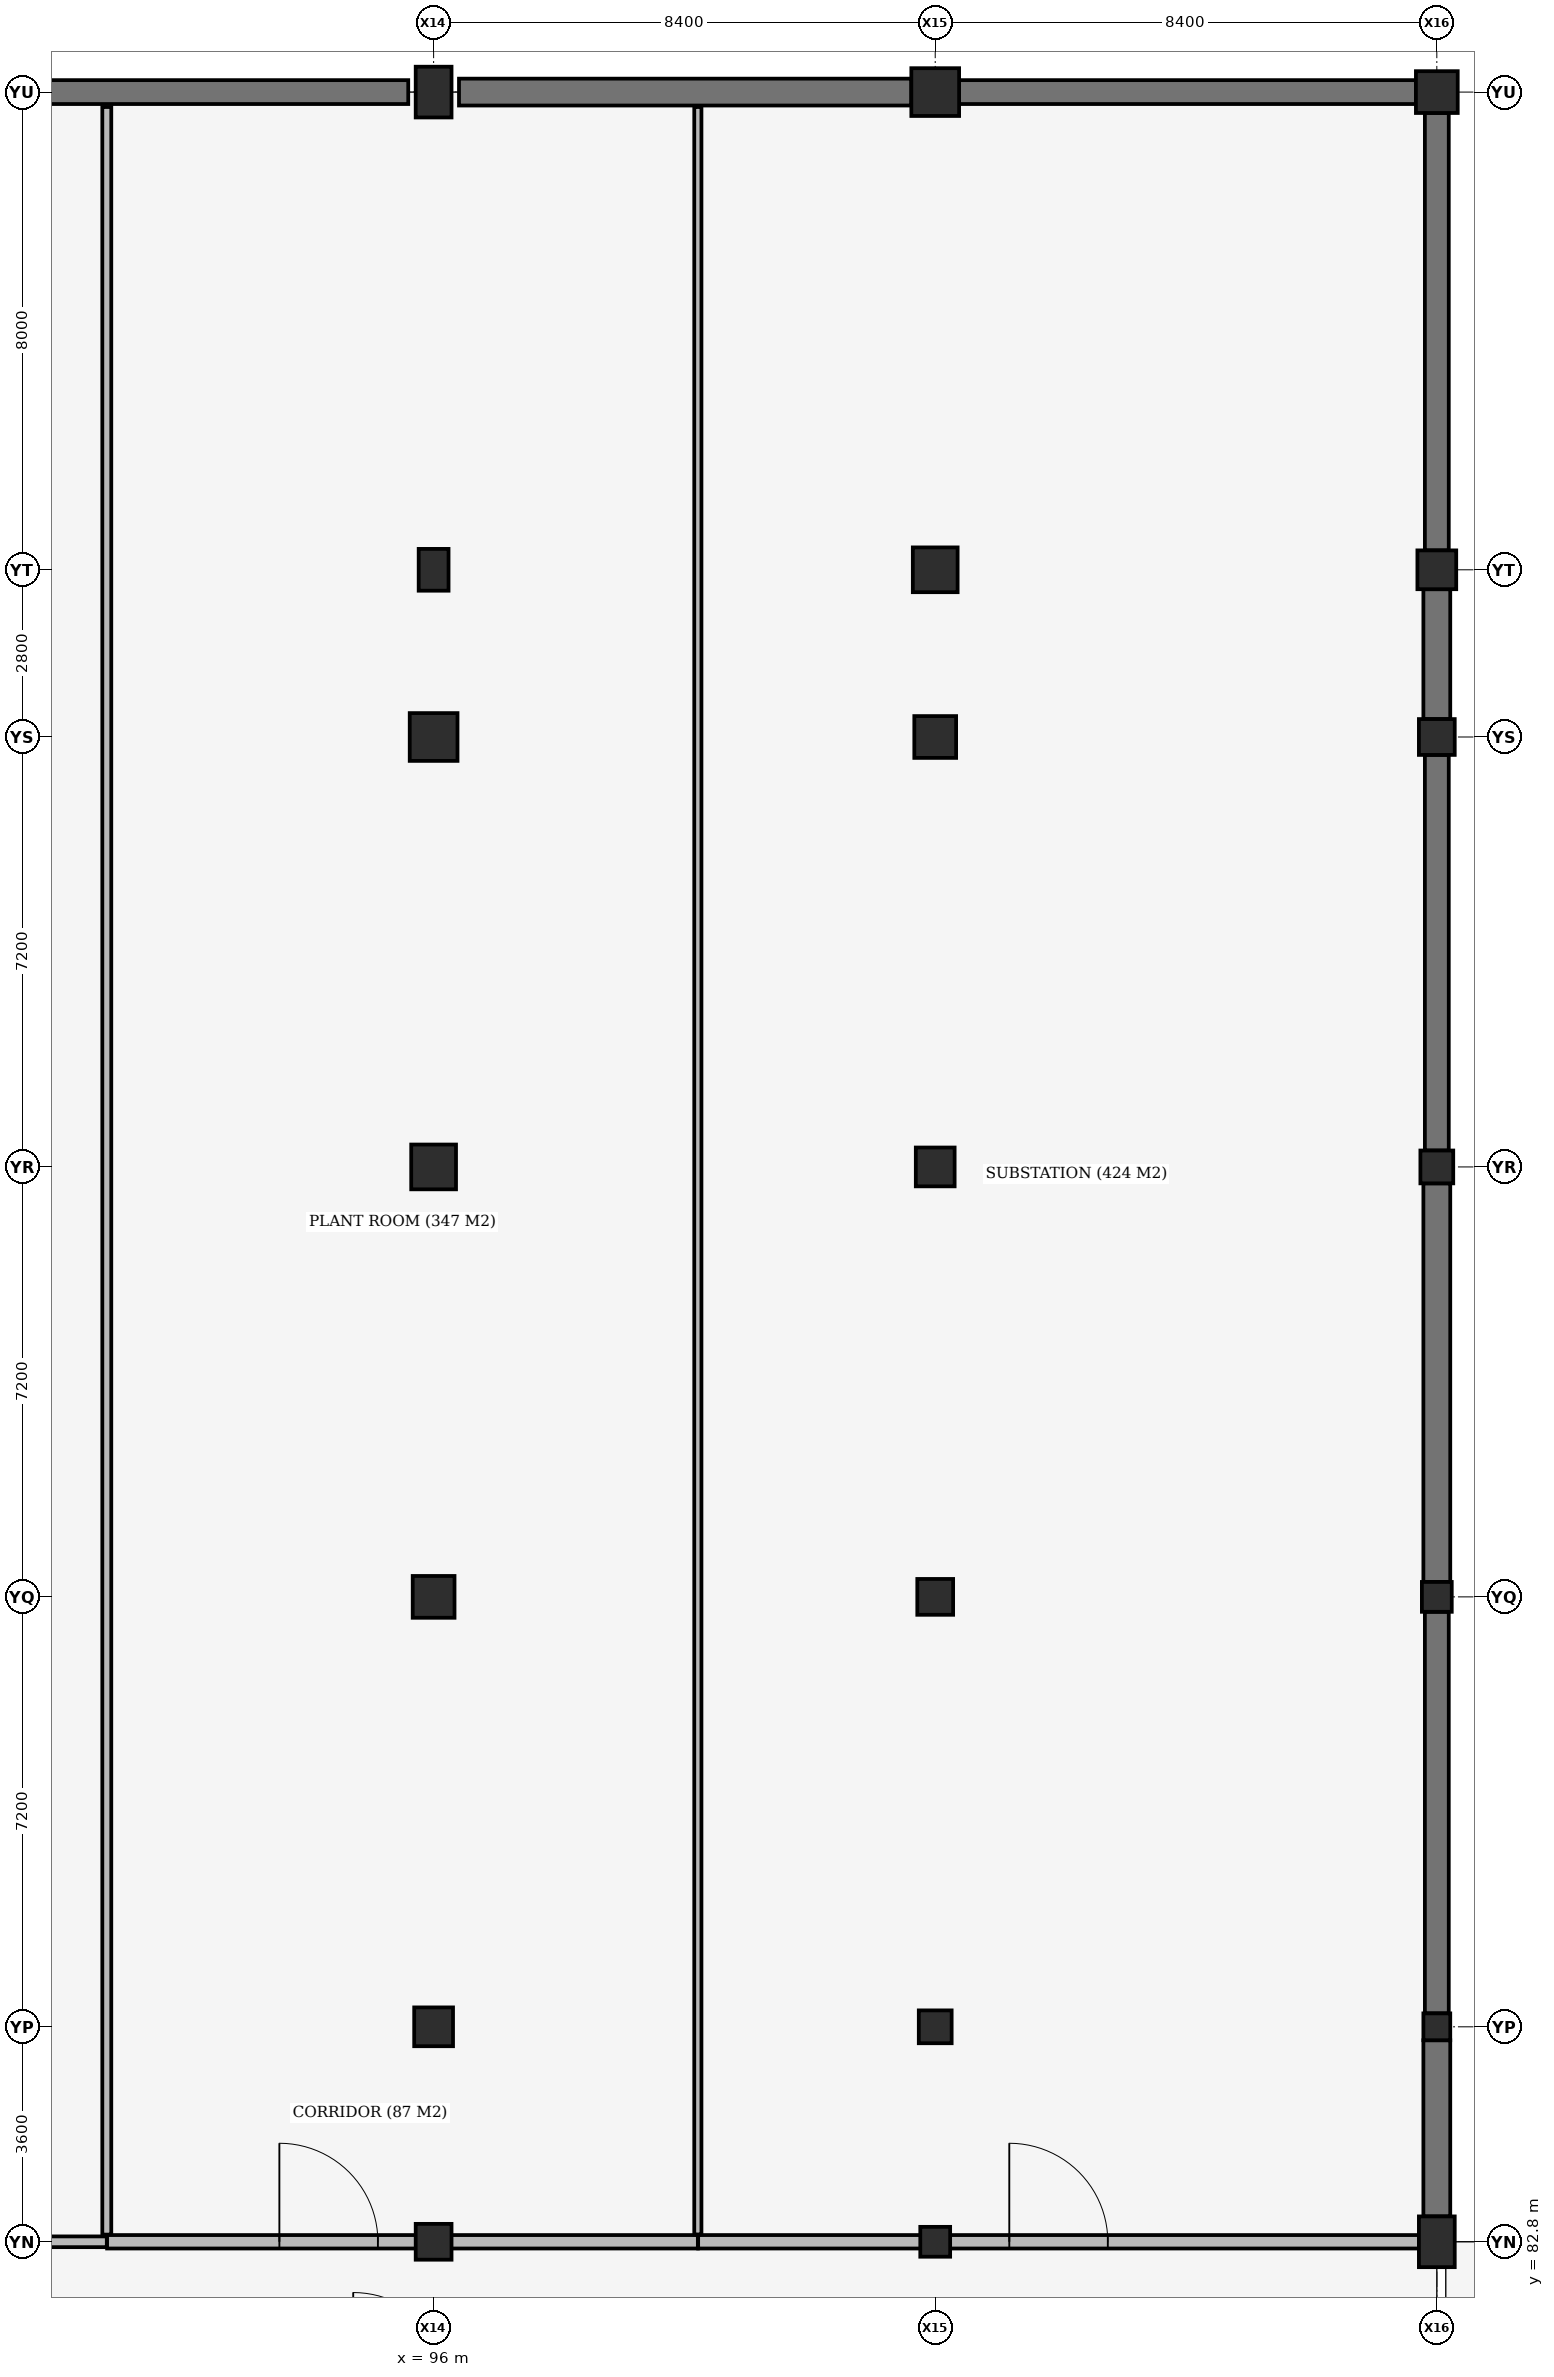
"""IFC4 building model, lengths in metres.
Left out: names, types, materials, properties, quantities, classifications, styles, units other than length and angle.
Written with IfcOpenShell. Run it as: python <this file> out.ifc"""

import sys

from ifc_helpers import new_model, si_unit, direction, frame, frame_2d, origin, origin_2d, place, context, subcontext, project, spatial, rectangle, extrude, element, fill, save


model = new_model("IFC4")
c1 = context("Model", 3, precision=1e-05, world=origin(), true_north=direction((0.0, 1.0)))
c2 = subcontext(c1, "Body", "Model", "MODEL_VIEW")
j1 = project(units=[si_unit("LENGTHUNIT", "METRE"), si_unit("PLANEANGLEUNIT", "RADIAN")], contexts=[c1])
p1 = place(None, origin())
s1 = spatial("IfcSite", under=j1, at=p1, CompositionType="ELEMENT")
p2 = place(p1, origin())
s2 = spatial("IfcBuilding", under=s1, at=p2, CompositionType="ELEMENT")
p3 = place(p2, frame((0.0, 0.0, -4.5)))
s3 = spatial("IfcBuildingStorey", under=s2, at=p3, CompositionType="ELEMENT", Elevation=-4.5)
p4 = place(p3, frame((96.0, 82.8, -0.46), z_axis=(0.0, 0.0, 1.0), x_axis=(1.0, 0.0, 0.0)))
e1 = element("IfcColumn", 1, at=p4, inside=s3, PredefinedType="COLUMN", context=c2, shape_type="SweptSolid", body=[
    extrude(rectangle(XDim=0.6, YDim=0.6, at=origin_2d()), origin(), (0.0, 0.0, 1.0), 4.61),
])
p5 = place(p3, frame((96.0, 86.4, -0.46), z_axis=(0.0, 0.0, 1.0), x_axis=(1.0, 0.0, 0.0)))
e2 = element("IfcColumn", 2, at=p5, inside=s3, PredefinedType="COLUMN", context=c2, shape_type="SweptSolid", body=[
    extrude(rectangle(XDim=0.65, YDim=0.65, at=origin_2d()), origin(), (0.0, 0.0, 1.0), 4.61),
])
p6 = place(p3, frame((96.0, 93.6, -0.46), z_axis=(0.0, 0.0, 1.0), x_axis=(1.0, 0.0, 0.0)))
e3 = element("IfcColumn", 3, at=p6, inside=s3, PredefinedType="COLUMN", context=c2, shape_type="SweptSolid", body=[
    extrude(rectangle(XDim=0.7, YDim=0.7, at=origin_2d()), origin(), (0.0, 0.0, 1.0), 4.72),
])
p7 = place(p3, frame((96.0, 100.8, -0.46), z_axis=(0.0, 0.0, 1.0), x_axis=(1.0, 0.0, 0.0)))
e4 = element("IfcColumn", 4, at=p7, inside=s3, PredefinedType="COLUMN", context=c2, shape_type="SweptSolid", body=[
    extrude(rectangle(XDim=0.75, YDim=0.75, at=origin_2d()), origin(), (0.0, 0.0, 1.0), 4.72),
])
p8 = place(p3, frame((96.0, 108.0, -0.46), z_axis=(0.0, 0.0, 1.0), x_axis=(1.0, 0.0, 0.0)))
e5 = element("IfcColumn", 5, at=p8, inside=s3, PredefinedType="COLUMN", context=c2, shape_type="SweptSolid", body=[
    extrude(rectangle(XDim=0.8, YDim=0.8, at=origin_2d()), origin(), (0.0, 0.0, 1.0), 4.61),
])
p9 = place(p3, frame((96.0, 110.8, -0.46), z_axis=(0.0, 0.0, 1.0), x_axis=(1.0, 0.0, 0.0)))
e6 = element("IfcColumn", 6, at=p9, inside=s3, PredefinedType="COLUMN", context=c2, shape_type="SweptSolid", body=[
    extrude(rectangle(XDim=0.5, YDim=0.7, at=origin_2d()), origin(), (0.0, 0.0, 1.0), 4.61),
])
p10 = place(p3, frame((96.0, 118.8, -0.46), z_axis=(0.0, 0.0, 1.0), x_axis=(1.0, 0.0, 0.0)))
e7 = element("IfcColumn", 7, at=p10, inside=s3, PredefinedType="COLUMN", context=c2, shape_type="SweptSolid", body=[
    extrude(rectangle(XDim=0.6, YDim=0.85, at=origin_2d()), origin(), (0.0, 0.0, 1.0), 4.61),
])
p11 = place(p3, frame((104.4, 82.8, -0.46), z_axis=(0.0, 0.0, 1.0), x_axis=(1.0, 0.0, 0.0)))
e8 = element("IfcColumn", 8, at=p11, inside=s3, PredefinedType="COLUMN", context=c2, shape_type="SweptSolid", body=[
    extrude(rectangle(XDim=0.5, YDim=0.5, at=origin_2d()), origin(), (0.0, 0.0, 1.0), 4.61),
])
p12 = place(p3, frame((104.4, 86.4, -0.46), z_axis=(0.0, 0.0, 1.0), x_axis=(1.0, 0.0, 0.0)))
e9 = element("IfcColumn", 9, at=p12, inside=s3, PredefinedType="COLUMN", context=c2, shape_type="SweptSolid", body=[
    extrude(rectangle(XDim=0.55, YDim=0.55, at=origin_2d()), origin(), (0.0, 0.0, 1.0), 4.61),
])
p13 = place(p3, frame((104.4, 93.6, -0.46), z_axis=(0.0, 0.0, 1.0), x_axis=(1.0, 0.0, 0.0)))
e10 = element("IfcColumn", 10, at=p13, inside=s3, PredefinedType="COLUMN", context=c2, shape_type="SweptSolid", body=[
    extrude(rectangle(XDim=0.6, YDim=0.6, at=origin_2d()), origin(), (0.0, 0.0, 1.0), 4.72),
])
p14 = place(p3, frame((104.4, 100.8, -0.46), z_axis=(0.0, 0.0, 1.0), x_axis=(1.0, 0.0, 0.0)))
e11 = element("IfcColumn", 11, at=p14, inside=s3, PredefinedType="COLUMN", context=c2, shape_type="SweptSolid", body=[
    extrude(rectangle(XDim=0.65, YDim=0.65, at=origin_2d()), origin(), (0.0, 0.0, 1.0), 4.72),
])
p15 = place(p3, frame((104.4, 108.0, -0.46), z_axis=(0.0, 0.0, 1.0), x_axis=(1.0, 0.0, 0.0)))
e12 = element("IfcColumn", 12, at=p15, inside=s3, PredefinedType="COLUMN", context=c2, shape_type="SweptSolid", body=[
    extrude(rectangle(XDim=0.7, YDim=0.7, at=origin_2d()), origin(), (0.0, 0.0, 1.0), 4.61),
])
p16 = place(p3, frame((104.4, 110.8, -0.46), z_axis=(0.0, 0.0, 1.0), x_axis=(1.0, 0.0, 0.0)))
e13 = element("IfcColumn", 13, at=p16, inside=s3, PredefinedType="COLUMN", context=c2, shape_type="SweptSolid", body=[
    extrude(rectangle(XDim=0.75, YDim=0.75, at=origin_2d()), origin(), (0.0, 0.0, 1.0), 4.61),
])
p17 = place(p3, frame((104.4, 118.8, -0.46), z_axis=(0.0, 0.0, 1.0), x_axis=(1.0, 0.0, 0.0)))
e14 = element("IfcColumn", 14, at=p17, inside=s3, PredefinedType="COLUMN", context=c2, shape_type="SweptSolid", body=[
    extrude(rectangle(XDim=0.8, YDim=0.8, at=origin_2d()), origin(), (0.0, 0.0, 1.0), 4.61),
])
p18 = place(p3, frame((112.8, 82.8, -0.46), z_axis=(0.0, 0.0, 1.0), x_axis=(1.0, 0.0, 0.0)))
e15 = element("IfcColumn", 15, at=p18, inside=s3, PredefinedType="COLUMN", context=c2, shape_type="SweptSolid", body=[
    extrude(rectangle(XDim=0.6, YDim=0.85, at=origin_2d()), origin(), (0.0, 0.0, 1.0), 4.61),
])
p19 = place(p3, frame((112.8, 86.4, -0.46), z_axis=(0.0, 0.0, 1.0), x_axis=(1.0, 0.0, 0.0)))
e16 = element("IfcColumn", 16, at=p19, inside=s3, PredefinedType="COLUMN", context=c2, shape_type="SweptSolid", body=[
    extrude(rectangle(XDim=0.45, YDim=0.45, at=origin_2d()), origin(), (0.0, 0.0, 1.0), 4.61),
])
p20 = place(p3, frame((112.8, 93.6, -0.46), z_axis=(0.0, 0.0, 1.0), x_axis=(1.0, 0.0, 0.0)))
e17 = element("IfcColumn", 17, at=p20, inside=s3, PredefinedType="COLUMN", context=c2, shape_type="SweptSolid", body=[
    extrude(rectangle(XDim=0.5, YDim=0.5, at=origin_2d()), origin(), (0.0, 0.0, 1.0), 4.61),
])
p21 = place(p3, frame((112.8, 100.8, -0.46), z_axis=(0.0, 0.0, 1.0), x_axis=(1.0, 0.0, 0.0)))
e18 = element("IfcColumn", 18, at=p21, inside=s3, PredefinedType="COLUMN", context=c2, shape_type="SweptSolid", body=[
    extrude(rectangle(XDim=0.55, YDim=0.55, at=origin_2d()), origin(), (0.0, 0.0, 1.0), 4.61),
])
p22 = place(p3, frame((112.8, 108.0, -0.46), z_axis=(0.0, 0.0, 1.0), x_axis=(1.0, 0.0, 0.0)))
e19 = element("IfcColumn", 19, at=p22, inside=s3, PredefinedType="COLUMN", context=c2, shape_type="SweptSolid", body=[
    extrude(rectangle(XDim=0.6, YDim=0.6, at=origin_2d()), origin(), (0.0, 0.0, 1.0), 4.61),
])
p23 = place(p3, frame((112.8, 110.8, -0.46), z_axis=(0.0, 0.0, 1.0), x_axis=(1.0, 0.0, 0.0)))
e20 = element("IfcColumn", 20, at=p23, inside=s3, PredefinedType="COLUMN", context=c2, shape_type="SweptSolid", body=[
    extrude(rectangle(XDim=0.65, YDim=0.65, at=origin_2d()), origin(), (0.0, 0.0, 1.0), 4.61),
])
p24 = place(p3, frame((112.8, 118.8, -0.46), z_axis=(0.0, 0.0, 1.0), x_axis=(1.0, 0.0, 0.0)))
e21 = element("IfcColumn", 21, at=p24, inside=s3, PredefinedType="COLUMN", context=c2, shape_type="SweptSolid", body=[
    extrude(rectangle(XDim=0.7, YDim=0.7, at=origin_2d()), origin(), (0.0, 0.0, 1.0), 4.61),
])
p25 = place(p3, frame((87.85, 118.8, 0.0), z_axis=(0.0, 0.0, 1.0), x_axis=(1.0, 0.0, 0.0)))
e22 = element("IfcWall", 22, at=p25, inside=s3, PredefinedType="USERDEFINED", context=c2, shape_type="SweptSolid", body=[
    extrude(rectangle(XDim=7.725, YDim=0.4, at=frame_2d((3.862, 0.0))), origin(), (0.0, 0.0, 1.0), 4.15),
])
p26 = place(p3, frame((96.425, 118.8, 0.0), z_axis=(0.0, 0.0, 1.0), x_axis=(1.0, 0.0, 0.0)))
e23 = element("IfcWall", 23, at=p26, inside=s3, PredefinedType="USERDEFINED", context=c2, shape_type="SweptSolid", body=[
    extrude(rectangle(XDim=7.575, YDim=0.45, at=frame_2d((3.788, 0.0))), origin(), (0.0, 0.0, 1.0), 4.15),
])
p27 = place(p3, frame((104.8, 118.8, 0.0), z_axis=(0.0, 0.0, 1.0), x_axis=(1.0, 0.0, 0.0)))
e24 = element("IfcWall", 24, at=p27, inside=s3, PredefinedType="USERDEFINED", context=c2, shape_type="SweptSolid", body=[
    extrude(rectangle(XDim=7.65, YDim=0.4, at=frame_2d((3.825, 0.0))), origin(), (0.0, 0.0, 1.0), 4.15),
])
p28 = place(p3, frame((112.8, 83.225, 0.0), z_axis=(0.0, 0.0, 1.0), x_axis=(0.0, 1.0, 0.0)))
e25 = element("IfcWall", 25, at=p28, inside=s3, PredefinedType="USERDEFINED", context=c2, shape_type="SweptSolid", body=[
    extrude(rectangle(XDim=2.95, YDim=0.45, at=frame_2d((1.475, 0.0))), origin(), (0.0, 0.0, 1.0), 4.15),
])
p29 = place(p3, frame((112.8, 86.625, 0.0), z_axis=(0.0, 0.0, 1.0), x_axis=(0.0, 1.0, 0.0)))
e26 = element("IfcWall", 26, at=p29, inside=s3, PredefinedType="USERDEFINED", context=c2, shape_type="SweptSolid", body=[
    extrude(rectangle(XDim=6.725, YDim=0.4, at=frame_2d((3.363, 0.0))), origin(), (0.0, 0.0, 1.0), 4.15),
])
p30 = place(p3, frame((112.8, 93.85, 0.0), z_axis=(0.0, 0.0, 1.0), x_axis=(0.0, 1.0, 0.0)))
e27 = element("IfcWall", 27, at=p30, inside=s3, PredefinedType="USERDEFINED", context=c2, shape_type="SweptSolid", body=[
    extrude(rectangle(XDim=6.675, YDim=0.45, at=frame_2d((3.337, 0.0))), origin(), (0.0, 0.0, 1.0), 4.15),
])
p31 = place(p3, frame((112.8, 101.075, 0.0), z_axis=(0.0, 0.0, 1.0), x_axis=(0.0, 1.0, 0.0)))
e28 = element("IfcWall", 28, at=p31, inside=s3, PredefinedType="USERDEFINED", context=c2, shape_type="SweptSolid", body=[
    extrude(rectangle(XDim=6.625, YDim=0.4, at=frame_2d((3.312, 0.0))), origin(), (0.0, 0.0, 1.0), 4.15),
])
p32 = place(p3, frame((112.8, 108.3, 0.0), z_axis=(0.0, 0.0, 1.0), x_axis=(0.0, 1.0, 0.0)))
e29 = element("IfcWall", 29, at=p32, inside=s3, PredefinedType="USERDEFINED", context=c2, shape_type="SweptSolid", body=[
    extrude(rectangle(XDim=2.175, YDim=0.45, at=frame_2d((1.087, 0.0))), origin(), (0.0, 0.0, 1.0), 4.15),
])
p33 = place(p3, frame((112.8, 111.125, 0.0), z_axis=(0.0, 0.0, 1.0), x_axis=(0.0, 1.0, 0.0)))
e30 = element("IfcWall", 30, at=p33, inside=s3, PredefinedType="USERDEFINED", context=c2, shape_type="SweptSolid", body=[
    extrude(rectangle(XDim=7.325, YDim=0.4, at=frame_2d((3.663, 0.0))), origin(), (0.0, 0.0, 1.0), 4.15),
])
p34 = place(p3, frame((78.205, 82.8, 0.0), z_axis=(0.0, 0.0, 1.0), x_axis=(1.0, 0.0, 0.0)))
e31 = element("IfcWall", 31, at=p34, inside=s3, PredefinedType="PARTITIONING", context=c2, shape_type="SweptSolid", body=[
    extrude(rectangle(XDim=12.322, YDim=0.18, at=frame_2d((6.161, 0.0))), origin(), (0.0, 0.0, 1.0), 3.35),
])
p35 = place(p34, frame((5.686, 0.0, 0.0)))
e32 = element("IfcOpeningElement", 32, at=p35, cuts=e31, PredefinedType="OPENING", context=c2, shape_type="SweptSolid", body=[
    extrude(rectangle(XDim=0.95, YDim=2.15, at=frame_2d((0.475, 1.075))), frame((0.0, 0.1, 0.0), z_axis=(0.0, -1.0, 0.0), x_axis=(1.0, 0.0, 0.0)), (0.0, 0.0, 1.0), 0.2),
])
p36 = place(p3, frame((90.527, 82.92, 0.0), z_axis=(0.0, 0.0, 1.0), x_axis=(0.0, 1.0, 0.0)))
e33 = element("IfcWall", 33, at=p36, inside=s3, PredefinedType="PARTITIONING", context=c2, shape_type="SweptSolid", body=[
    extrude(rectangle(XDim=35.63, YDim=0.15, at=frame_2d((17.815, 0.0))), origin(), (0.0, 0.0, 1.0), 3.35),
])
p37 = place(p3, frame((90.532, 82.8, 0.0), z_axis=(0.0, 0.0, 1.0), x_axis=(1.0, 0.0, 0.0)))
e34 = element("IfcWall", 34, at=p37, inside=s3, PredefinedType="STANDARD", context=c2, shape_type="SweptSolid", body=[
    extrude(rectangle(XDim=9.893, YDim=0.225, at=frame_2d((4.947, 0.0))), origin(), (0.0, 0.0, 1.0), 3.4),
])
p38 = place(p37, frame((2.885, 0.0, 0.0)))
e35 = element("IfcOpeningElement", 35, at=p38, cuts=e34, PredefinedType="OPENING", context=c2, shape_type="SweptSolid", body=[
    extrude(rectangle(XDim=1.65, YDim=2.25, at=frame_2d((0.825, 1.125))), frame((0.0, 0.123, 0.0), z_axis=(0.0, -1.0, 0.0), x_axis=(1.0, 0.0, 0.0)), (0.0, 0.0, 1.0), 0.245),
])
p39 = place(p3, frame((100.425, 82.923, 0.0), z_axis=(0.0, 0.0, 1.0), x_axis=(0.0, 1.0, 0.0)))
e36 = element("IfcWall", 36, at=p39, inside=s3, PredefinedType="PARTITIONING", context=c2, shape_type="SweptSolid", body=[
    extrude(rectangle(XDim=35.627, YDim=0.12, at=frame_2d((17.814, 0.0))), origin(), (0.0, 0.0, 1.0), 3.35),
])
p40 = place(p3, frame((100.43, 82.8, 0.0), z_axis=(0.0, 0.0, 1.0), x_axis=(1.0, 0.0, 0.0)))
e37 = element("IfcWall", 37, at=p40, inside=s3, PredefinedType="STANDARD", context=c2, shape_type="SweptSolid", body=[
    extrude(rectangle(XDim=12.071, YDim=0.225, at=frame_2d((6.036, 0.0))), origin(), (0.0, 0.0, 1.0), 3.35),
])
p41 = place(p40, frame((5.21, 0.0, 0.0)))
e38 = element("IfcOpeningElement", 38, at=p41, cuts=e37, PredefinedType="OPENING", context=c2, shape_type="SweptSolid", body=[
    extrude(rectangle(XDim=1.65, YDim=2.25, at=frame_2d((0.825, 1.125))), frame((0.0, 0.123, 0.0), z_axis=(0.0, -1.0, 0.0), x_axis=(1.0, 0.0, 0.0)), (0.0, 0.0, 1.0), 0.245),
])
p42 = place(p38, origin())
e39 = element("IfcDoor", 39, at=p42, inside=s3, OperationType="DOUBLE_DOOR_SINGLE_SWING", PredefinedType="DOOR", context=c2, shape_type="SweptSolid", body=[
    extrude(rectangle(XDim=1.65, YDim=2.25, at=frame_2d((0.825, 1.125))), frame((0.0, 0.025, 0.0), z_axis=(0.0, -1.0, 0.0), x_axis=(1.0, 0.0, 0.0)), (0.0, 0.0, 1.0), 0.05),
])
fill(e35, e39)
p43 = place(p41, origin())
e40 = element("IfcDoor", 40, at=p43, inside=s3, OperationType="DOUBLE_DOOR_SINGLE_SWING", PredefinedType="DOOR", context=c2, shape_type="SweptSolid", body=[
    extrude(rectangle(XDim=1.65, YDim=2.25, at=frame_2d((0.825, 1.125))), frame((0.0, 0.025, 0.0), z_axis=(0.0, -1.0, 0.0), x_axis=(1.0, 0.0, 0.0)), (0.0, 0.0, 1.0), 0.05),
])
fill(e38, e40)
save(model, sys.argv[1])
